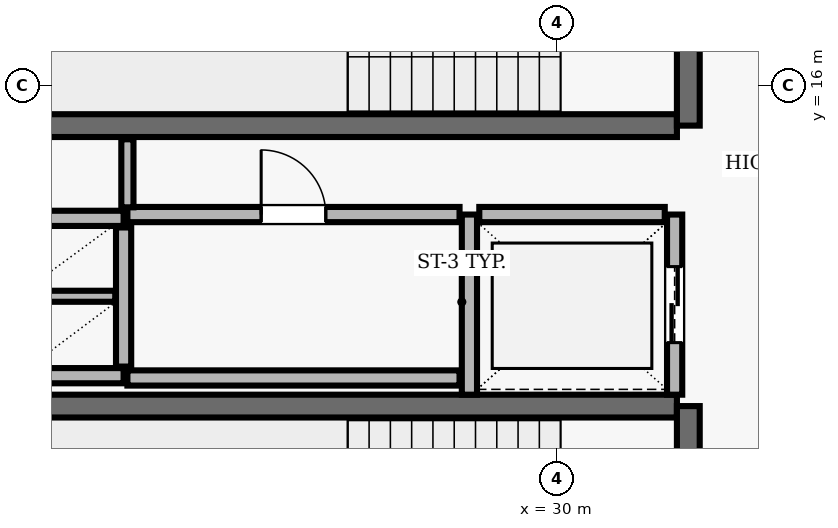
"""IFC4 building model, lengths in metres.
Left out: names, types, materials, properties, quantities, classifications, styles, units other than length and angle.
Written with IfcOpenShell. Run it as: python <this file> out.ifc"""

import sys

from ifc_helpers import new_model, si_unit, direction, frame, frame_2d, origin, place, context, subcontext, project, spatial, rectangle, extrude, element, fill, save


model = new_model("IFC4")
c1 = context("Model", 3, precision=1e-05, world=origin(), true_north=direction((0.0, 1.0)))
c2 = subcontext(c1, "Body", "Model", "MODEL_VIEW")
j1 = project(units=[si_unit("LENGTHUNIT", "METRE"), si_unit("PLANEANGLEUNIT", "RADIAN")], contexts=[c1])
p1 = place(None, origin())
s1 = spatial("IfcSite", under=j1, at=p1, CompositionType="ELEMENT")
p2 = place(p1, origin())
s2 = spatial("IfcBuilding", under=s1, at=p2, CompositionType="ELEMENT")
p3 = place(p2, frame((0.0, 0.0, 187.5)))
s3 = spatial("IfcBuildingStorey", under=s2, at=p3, CompositionType="ELEMENT", Elevation=187.5)
p4 = place(p3, frame((23.22, 15.47, 0.0), z_axis=(0.0, 0.0, 1.0), x_axis=(1.0, 0.0, 0.0)))
e1 = element("IfcWall", 1, at=p4, inside=s3, PredefinedType="SHEAR", context=c2, shape_type="SweptSolid", body=[
    extrude(rectangle(XDim=8.36, YDim=0.3, at=frame_2d((4.18, 0.0))), origin(), (0.0, 0.0, 1.0), 3.69),
])
p5 = place(p3, frame((31.73, 15.47, 0.0), z_axis=(0.0, 0.0, 1.0), x_axis=(0.0, 1.0, 0.0)))
e2 = element("IfcWall", 2, at=p5, inside=s3, PredefinedType="SHEAR", context=c2, shape_type="SweptSolid", body=[
    extrude(rectangle(XDim=3.51, YDim=0.3, at=frame_2d((1.755, 0.0))), origin(), (0.0, 0.0, 1.0), 3.69),
])
p6 = place(p5, frame((1.18, 0.0, 0.0)))
e3 = element("IfcOpeningElement", 3, at=p6, cuts=e2, PredefinedType="OPENING", context=c2, shape_type="SweptSolid", body=[
    extrude(rectangle(XDim=1.15, YDim=2.15, at=frame_2d((0.575, 1.075))), frame((0.0, 0.16, 0.0), z_axis=(0.0, -1.0, 0.0), x_axis=(1.0, 0.0, 0.0)), (0.0, 0.0, 1.0), 0.32),
])
p7 = place(p3, frame((31.58, 11.78, 0.0), z_axis=(0.0, 0.0, 1.0), x_axis=(-1.0, 0.0, 0.0)))
e4 = element("IfcWall", 4, at=p7, inside=s3, PredefinedType="SHEAR", context=c2, shape_type="SweptSolid", body=[
    extrude(rectangle(XDim=8.36, YDim=0.3, at=frame_2d((4.18, 0.0))), origin(), (0.0, 0.0, 1.0), 3.69),
])
p8 = place(p3, frame((31.73, 8.27, 0.0), z_axis=(0.0, 0.0, 1.0), x_axis=(0.0, 1.0, 0.0)))
e5 = element("IfcWall", 5, at=p8, inside=s3, PredefinedType="SHEAR", context=c2, shape_type="SweptSolid", body=[
    extrude(rectangle(XDim=3.51, YDim=0.3, at=frame_2d((1.755, 0.0))), origin(), (0.0, 0.0, 1.0), 3.69),
])
p9 = place(p8, frame((1.18, 0.0, 0.0)))
e6 = element("IfcOpeningElement", 6, at=p9, cuts=e5, PredefinedType="OPENING", context=c2, shape_type="SweptSolid", body=[
    extrude(rectangle(XDim=1.15, YDim=2.15, at=frame_2d((0.575, 1.075))), frame((0.0, 0.16, 0.0), z_axis=(0.0, -1.0, 0.0), x_axis=(1.0, 0.0, 0.0)), (0.0, 0.0, 1.0), 0.32),
])
p10 = place(p3, frame((28.85, 14.3, 0.0), z_axis=(0.0, 0.0, 1.0), x_axis=(0.0, -1.0, 0.0)))
e7 = element("IfcWall", 7, at=p10, inside=s3, PredefinedType="SOLIDWALL", context=c2, shape_type="SweptSolid", body=[
    extrude(rectangle(XDim=2.37, YDim=0.2, at=frame_2d((1.185, 0.0))), origin(), (0.0, 0.0, 1.0), 3.69),
])
p11 = place(p3, frame((31.55, 11.93, 0.0), z_axis=(0.0, 0.0, 1.0), x_axis=(0.0, 1.0, 0.0)))
e8 = element("IfcWall", 8, at=p11, inside=s3, PredefinedType="SOLIDWALL", context=c2, shape_type="SweptSolid", body=[
    extrude(rectangle(XDim=2.37, YDim=0.2, at=frame_2d((1.185, 0.0))), origin(), (0.0, 0.0, 1.0), 3.69),
])
p12 = place(p11, frame((0.685, 0.0, 0.0)))
e9 = element("IfcOpeningElement", 9, at=p12, cuts=e8, PredefinedType="OPENING", context=c2, shape_type="SweptSolid", body=[
    extrude(rectangle(XDim=1.0, YDim=2.1, at=frame_2d((0.5, 1.05))), frame((0.0, 0.11, 0.0), z_axis=(0.0, -1.0, 0.0), x_axis=(1.0, 0.0, 0.0)), (0.0, 0.0, 1.0), 0.22),
])
p13 = place(p3, frame((31.42, 14.3, 0.0), z_axis=(0.0, 0.0, 1.0), x_axis=(-1.0, 0.0, 0.0)))
e10 = element("IfcWall", 10, at=p13, inside=s3, PredefinedType="SOLIDWALL", context=c2, shape_type="SweptSolid", body=[
    extrude(rectangle(XDim=2.44, YDim=0.2, at=frame_2d((1.22, 0.0))), origin(), (0.0, 0.0, 1.0), 3.69),
])
for number, where, z_axis, x_axis in (
    (11, (22.9, 14.25, 0.0), (0.0, 0.0, 1.0), (1.0, 0.0, 0.0)),
    (12, (22.9, 12.18, 0.0), (0.0, 0.0, 1.0), (1.0, 0.0, 0.0)),
):
    element("IfcWall", number, at=place(p3, frame(where, z_axis=z_axis, x_axis=x_axis)), inside=s3, PredefinedType="SOLIDWALL", context=c2, shape_type="SweptSolid", body=[
        extrude(rectangle(XDim=1.4, YDim=0.2, at=frame_2d((0.7, 0.0))), origin(), (0.0, 0.0, 1.0), 3.69),
    ])
p14 = place(p3, frame((24.3, 12.3, 0.0), z_axis=(0.0, 0.0, 1.0), x_axis=(0.0, 1.0, 0.0)))
e13 = element("IfcWall", 13, at=p14, inside=s3, PredefinedType="SOLIDWALL", context=c2, shape_type="SweptSolid", body=[
    extrude(rectangle(XDim=1.83, YDim=0.2, at=frame_2d((0.915, 0.0))), origin(), (0.0, 0.0, 1.0), 3.69),
])
p15 = place(p3, frame((23.01, 13.225, 0.0), z_axis=(0.0, 0.0, 1.0), x_axis=(1.0, 0.0, 0.0)))
e14 = element("IfcWall", 14, at=p15, inside=s3, PredefinedType="PARTITIONING", context=c2, shape_type="SweptSolid", body=[
    extrude(rectangle(XDim=1.18, YDim=0.145, at=frame_2d((0.59, 0.0))), origin(), (0.0, 0.0, 1.0), 3.69),
])
p16 = place(p3, frame((24.35, 12.15, 0.0), z_axis=(0.0, 0.0, 1.0), x_axis=(1.0, 0.0, 0.0)))
e15 = element("IfcWall", 15, at=p16, inside=s3, PredefinedType="SOLIDWALL", context=c2, shape_type="SweptSolid", body=[
    extrude(rectangle(XDim=4.37, YDim=0.2, at=frame_2d((2.185, 0.0))), origin(), (0.0, 0.0, 1.0), 3.69),
])
p17 = place(p3, frame((24.35, 14.3, 0.0), z_axis=(0.0, 0.0, 1.0), x_axis=(1.0, 0.0, 0.0)))
e16 = element("IfcWall", 16, at=p17, inside=s3, PredefinedType="SOLIDWALL", context=c2, shape_type="SweptSolid", body=[
    extrude(rectangle(XDim=4.37, YDim=0.2, at=frame_2d((2.185, 0.0))), origin(), (0.0, 0.0, 1.0), 3.69),
])
p18 = place(p17, frame((1.76, 0.0, 0.0)))
e17 = element("IfcOpeningElement", 17, at=p18, cuts=e16, PredefinedType="OPENING", context=c2, shape_type="SweptSolid", body=[
    extrude(rectangle(XDim=0.85, YDim=2.1, at=frame_2d((0.425, 1.05))), frame((0.0, 0.11, 0.0), z_axis=(0.0, -1.0, 0.0), x_axis=(1.0, 0.0, 0.0)), (0.0, 0.0, 1.0), 0.22),
])
p19 = place(p3, frame((24.35, 15.29, 0.0), z_axis=(0.0, 0.0, 1.0), x_axis=(0.0, -1.0, 0.0)))
e18 = element("IfcWall", 18, at=p19, inside=s3, PredefinedType="PARTITIONING", context=c2, shape_type="SweptSolid", body=[
    extrude(rectangle(XDim=0.895, YDim=0.16, at=frame_2d((0.448, 0.0))), origin(), (0.0, 0.0, 1.0), 3.69),
])
p20 = place(p12, origin())
e19 = element("IfcDoor", 19, at=p20, inside=s3, OperationType="DOUBLE_DOOR_SLIDING", PredefinedType="DOOR", context=c2, shape_type="SweptSolid", body=[
    extrude(rectangle(XDim=1.0, YDim=2.1, at=frame_2d((0.5, 1.05))), frame((0.0, 0.025, 0.0), z_axis=(0.0, -1.0, 0.0), x_axis=(1.0, 0.0, 0.0)), (0.0, 0.0, 1.0), 0.05),
])
fill(e9, e19)
p21 = place(p18, origin())
e20 = element("IfcDoor", 20, at=p21, inside=s3, OperationType="SINGLE_SWING_LEFT", PredefinedType="DOOR", context=c2, shape_type="SweptSolid", body=[
    extrude(rectangle(XDim=0.85, YDim=2.1, at=frame_2d((0.425, 1.05))), frame((0.0, 0.025, 0.0), z_axis=(0.0, -1.0, 0.0), x_axis=(1.0, 0.0, 0.0)), (0.0, 0.0, 1.0), 0.05),
])
fill(e17, e20)
save(model, sys.argv[1])
